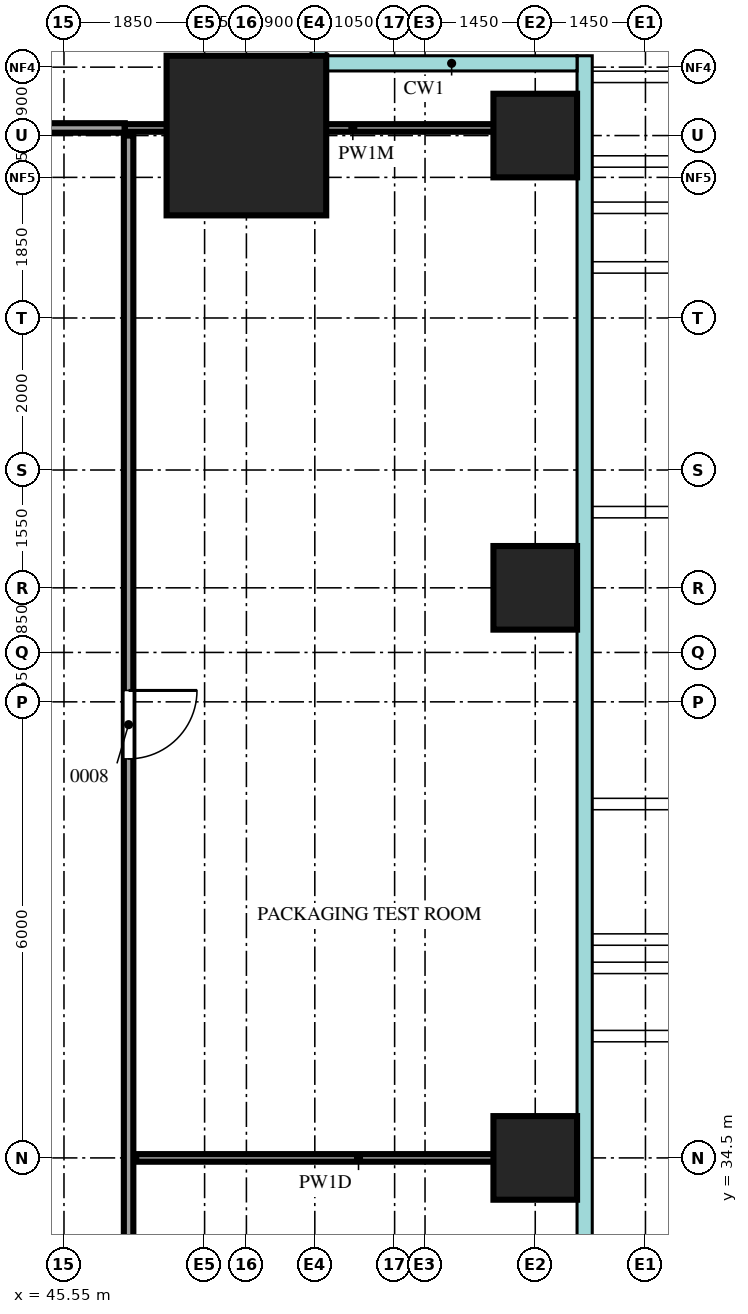
"""IFC4 building model, lengths in metres.
Left out: names, types, materials, properties, quantities, classifications, styles, units other than length and angle.
Written with IfcOpenShell. Run it as: python <this file> out.ifc"""

import sys

from ifc_helpers import new_model, si_unit, direction, frame, frame_2d, origin, origin_2d, place, context, subcontext, project, spatial, rectangle, extrude, source, transform, mapped, element, fill, save


model = new_model("IFC4")
c1 = context("Model", 3, precision=1e-05, world=origin(), true_north=direction((0.0, 1.0)))
c2 = subcontext(c1, "Body", "Model", "MODEL_VIEW")
j1 = project(units=[si_unit("LENGTHUNIT", "METRE"), si_unit("PLANEANGLEUNIT", "RADIAN")], contexts=[c1])
p1 = place(None, origin())
s1 = spatial("IfcSite", under=j1, at=p1, CompositionType="ELEMENT")
p2 = place(p1, origin())
s2 = spatial("IfcBuilding", under=s1, at=p2, CompositionType="ELEMENT")
p3 = place(p2, frame((0.0, 0.0, 114.7)))
s3 = spatial("IfcBuildingStorey", under=s2, at=p3, CompositionType="ELEMENT", Elevation=114.7)
m1 = source(origin(), c2, "Body", "SweptSolid", [
    extrude(rectangle(XDim=2.1, YDim=2.1, at=origin_2d()), origin(), (0.0, 0.0, 1.0), 4.4),
])
p4 = place(p3, frame((47.95, 47.95, 0.0), z_axis=(0.0, 0.0, 1.0), x_axis=(1.0, 0.0, 0.0)))
e1 = element("IfcColumn", 1, at=p4, inside=s3, PredefinedType="COLUMN", context=c2, shape_type="MappedRepresentation", body=[
    mapped(m1, transform((0.0, 0.0, 0.0))),
])
m2 = source(origin(), c2, "Body", "SweptSolid", [
    extrude(rectangle(XDim=1.1, YDim=1.1, at=origin_2d()), origin(), (0.0, 0.0, 1.0), 4.1),
])
for number, where, z_axis, x_axis in (
    (2, (51.75, 34.5, 0.0), (0.0, 0.0, 1.0), (1.0, 0.0, 0.0)),
    (3, (51.75, 42.0, 0.0), (0.0, 0.0, 1.0), (1.0, 0.0, 0.0)),
    (4, (51.75, 47.95, 0.0), (0.0, 0.0, 1.0), (1.0, 0.0, 0.0)),
):
    element("IfcColumn", number, at=place(p3, frame(where, z_axis=z_axis, x_axis=x_axis)), inside=s3, PredefinedType="COLUMN", context=c2, shape_type="MappedRepresentation", body=[
        mapped(m2, transform((0.0, 0.0, 0.0))),
    ])
m3 = source(origin(), c2, "Body", "SweptSolid", [
    extrude(rectangle(XDim=37.65, YDim=0.125, at=frame_2d((18.825, 0.0))), origin(), (0.0, 0.0, 1.0), 4.2),
])
p5 = place(p3, frame((46.4, 10.3, 0.0), z_axis=(0.0, 0.0, 1.0), x_axis=(0.0, 1.0, 0.0)))
e5 = element("IfcWall", 5, at=p5, inside=s3, PredefinedType="PARTITIONING", context=c2, shape_type="MappedRepresentation", body=[
    mapped(m3, transform((0.0, 0.0, 0.0))),
])
m4 = source(origin(), c2, "Body", "SweptSolid", [
    extrude(rectangle(XDim=1.2, YDim=2.1, at=frame_2d((0.6, 1.05))), frame((0.0, 0.073, 0.0), z_axis=(0.0, -1.0, 0.0), x_axis=(1.0, 0.0, 0.0)), (0.0, 0.0, 1.0), 0.145),
])
p6 = place(p5, frame((11.6, 0.0, 0.0)))
e6 = element("IfcOpeningElement", 6, at=p6, cuts=e5, PredefinedType="OPENING", context=c2, shape_type="MappedRepresentation", body=[
    mapped(m4, transform((0.0, 0.0, 0.0))),
])
m5 = source(origin(), c2, "Body", "SweptSolid", [
    extrude(rectangle(XDim=0.9, YDim=2.1, at=frame_2d((0.45, 1.05))), frame((0.0, 0.073, 0.0), z_axis=(0.0, -1.0, 0.0), x_axis=(1.0, 0.0, 0.0)), (0.0, 0.0, 1.0), 0.145),
])
p7 = place(p5, frame((29.45, 0.0, 0.0)))
e7 = element("IfcOpeningElement", 7, at=p7, cuts=e5, PredefinedType="OPENING", context=c2, shape_type="MappedRepresentation", body=[
    mapped(m5, transform((0.0, 0.0, 0.0))),
])
m6 = source(origin(), c2, "Body", "SweptSolid", [
    extrude(rectangle(XDim=5.85, YDim=0.1, at=frame_2d((2.925, 0.0))), origin(), (0.0, 0.0, 1.0), 4.2),
])
p8 = place(p3, frame((46.5, 34.5, 0.0), z_axis=(0.0, 0.0, 1.0), x_axis=(1.0, 0.0, 0.0)))
e8 = element("IfcWall", 8, at=p8, inside=s3, PredefinedType="PARTITIONING", context=c2, shape_type="MappedRepresentation", body=[
    mapped(m6, transform((0.0, 0.0, 0.0))),
])
m7 = source(origin(), c2, "Body", "SweptSolid", [
    extrude(rectangle(XDim=42.2, YDim=0.125, at=frame_2d((21.1, 0.0))), origin(), (0.0, 0.0, 1.0), 3.55),
])
p9 = place(p3, frame((4.15, 48.05, 0.0), z_axis=(0.0, 0.0, 1.0), x_axis=(1.0, 0.0, 0.0)))
e9 = element("IfcWall", 9, at=p9, inside=s3, PredefinedType="PARTITIONING", context=c2, shape_type="MappedRepresentation", body=[
    mapped(m7, transform((0.0, 0.0, 0.0))),
])
p10 = place(p9, frame((7.25, 0.0, 0.0)))
e10 = element("IfcOpeningElement", 10, at=p10, cuts=e9, PredefinedType="OPENING", context=c2, shape_type="MappedRepresentation", body=[
    mapped(m5, transform((0.0, 0.0, 0.0))),
])
p11 = place(p9, frame((22.55, 0.0, 0.0)))
e11 = element("IfcOpeningElement", 11, at=p11, cuts=e9, PredefinedType="OPENING", context=c2, shape_type="MappedRepresentation", body=[
    mapped(m5, transform((0.0, 0.0, 0.0))),
])
p12 = place(p9, frame((35.85, 0.0, 0.0)))
e12 = element("IfcOpeningElement", 12, at=p12, cuts=e9, PredefinedType="OPENING", context=c2, shape_type="MappedRepresentation", body=[
    mapped(m5, transform((0.0, 0.0, 0.0))),
])
m8 = source(origin(), c2, "Body", "SweptSolid", [
    extrude(rectangle(XDim=6.0, YDim=0.1, at=frame_2d((3.0, 0.0))), origin(), (0.0, 0.0, 1.0), 3.55),
])
p13 = place(p3, frame((46.35, 48.05, 0.0), z_axis=(0.0, 0.0, 1.0), x_axis=(1.0, 0.0, 0.0)))
e13 = element("IfcWall", 13, at=p13, inside=s3, PredefinedType="PARTITIONING", context=c2, shape_type="MappedRepresentation", body=[
    mapped(m8, transform((0.0, 0.0, 0.0))),
])
m9 = source(origin(), c2, "Body", "SweptSolid", [
    extrude(rectangle(XDim=0.9, YDim=2.1, at=frame_2d((0.45, 1.05))), frame((0.0, 0.025, 0.0), z_axis=(0.0, -1.0, 0.0), x_axis=(1.0, 0.0, 0.0)), (0.0, 0.0, 1.0), 0.05),
])
p14 = place(p7, origin())
e14 = element("IfcDoor", 14, at=p14, inside=s3, OperationType="SINGLE_SWING_RIGHT", PredefinedType="DOOR", context=c2, shape_type="MappedRepresentation", body=[
    mapped(m9, transform((0.0, 0.0, 0.0))),
])
fill(e7, e14)
save(model, sys.argv[1])
